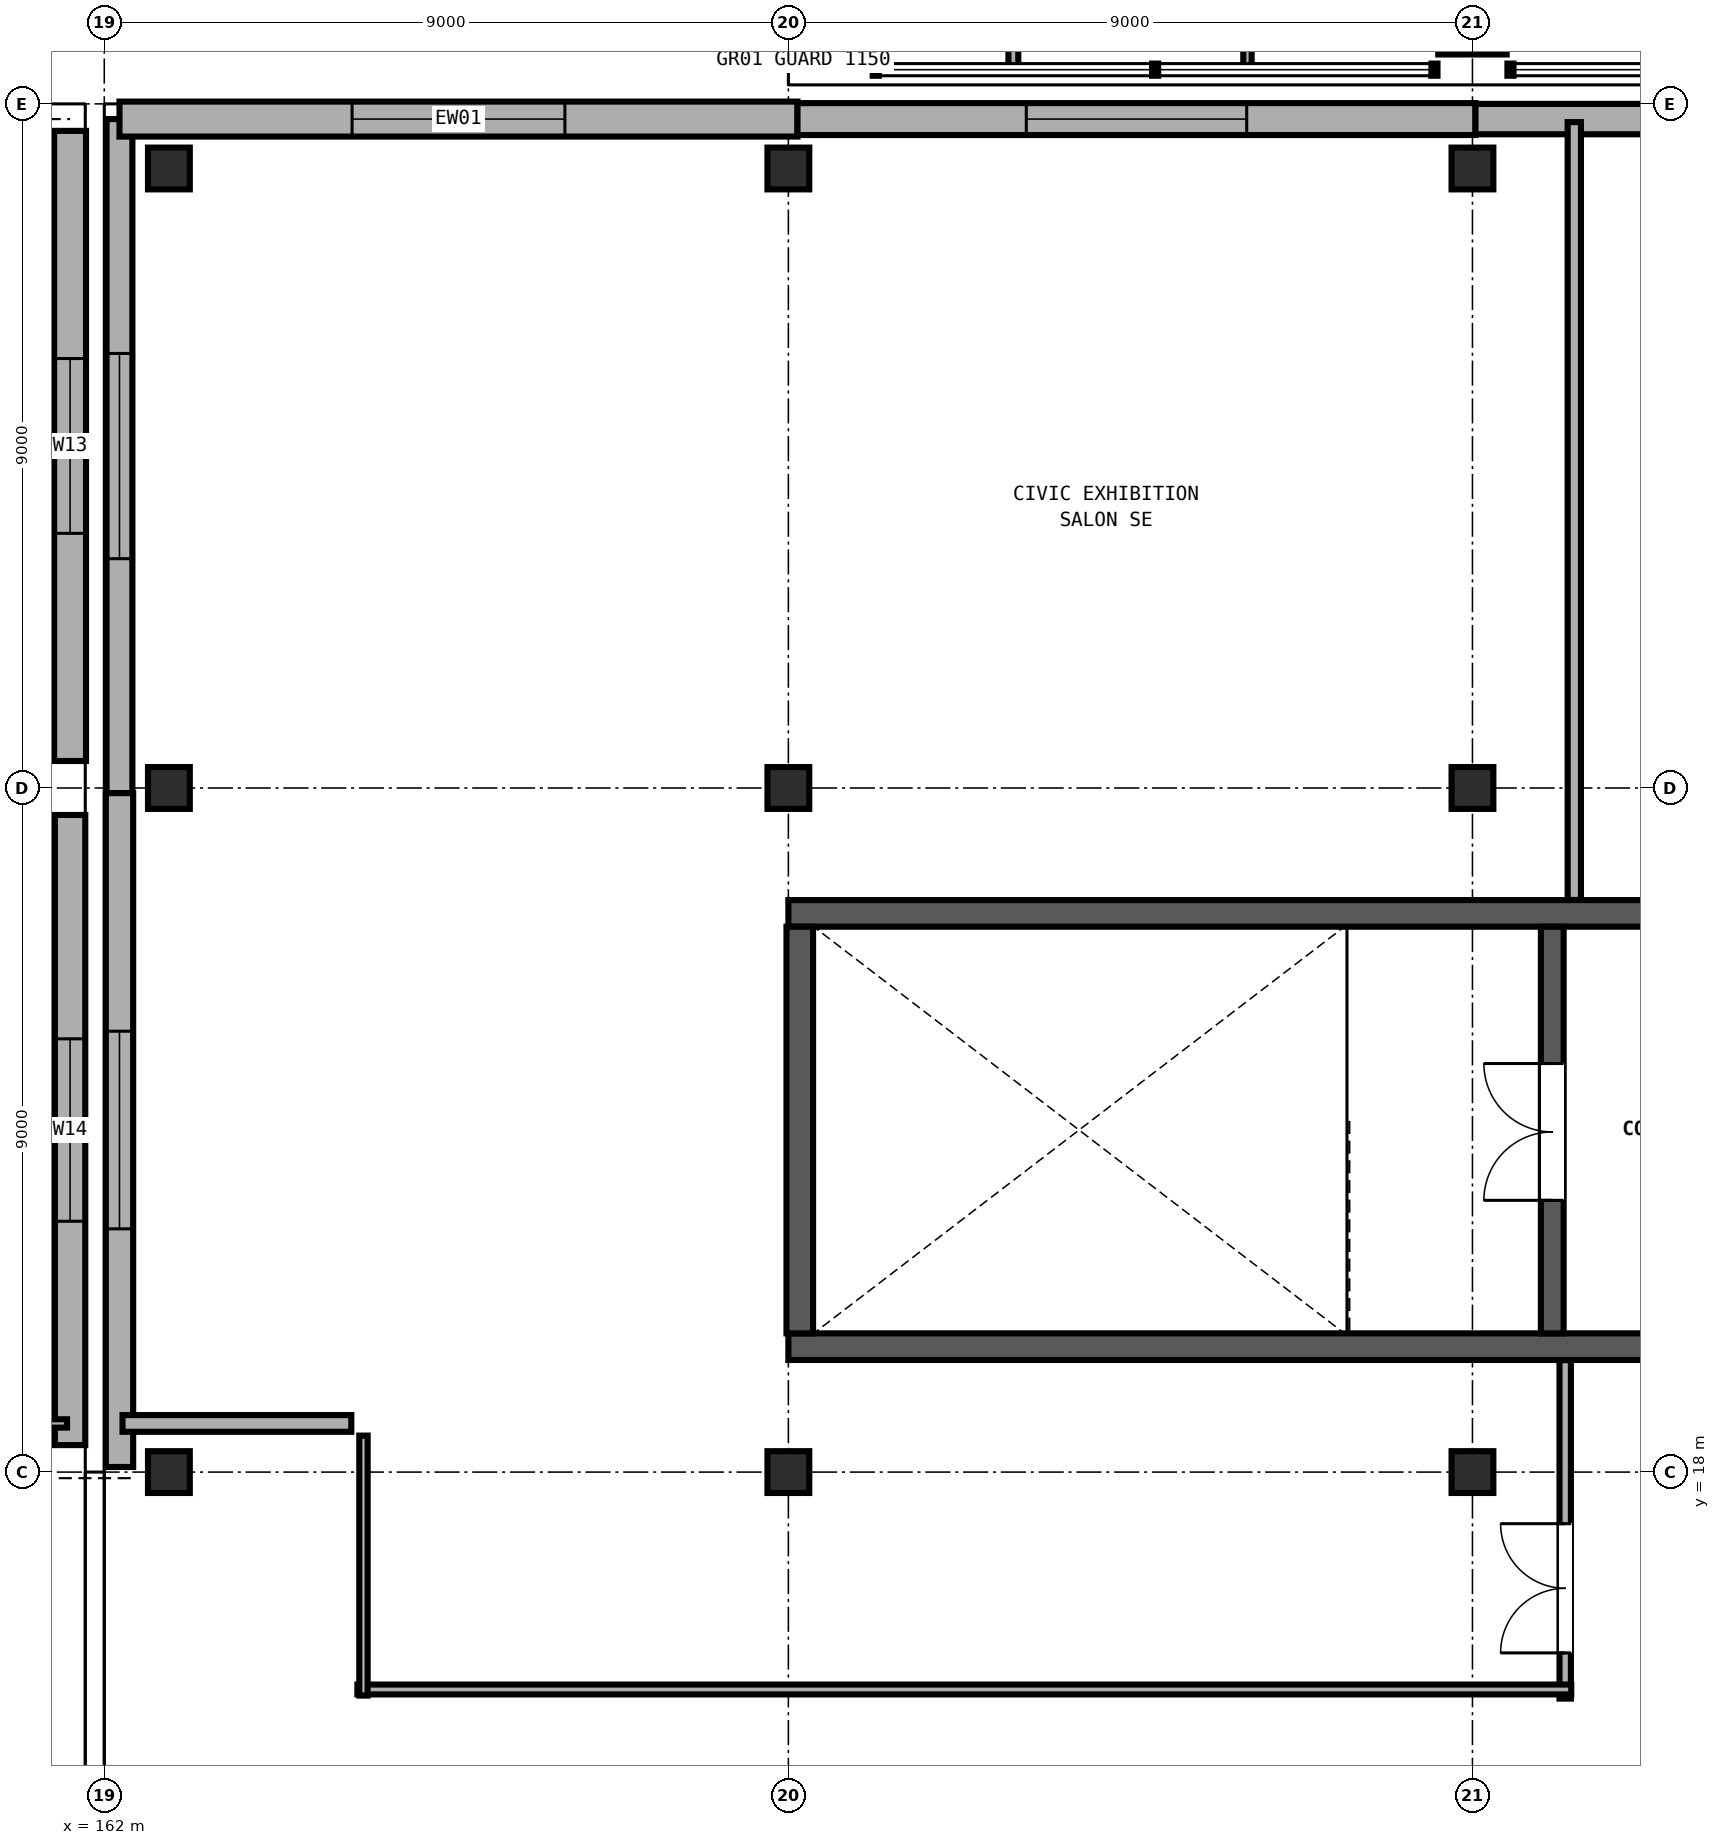
"""IFC4 building model, lengths in metres.
Left out: names, types, materials, properties, quantities, classifications, styles, units other than length and angle.
Written with IfcOpenShell. Run it as: python <this file> out.ifc"""

import sys

from ifc_helpers import new_model, si_unit, direction, frame, frame_2d, origin, origin_2d, place, context, subcontext, project, spatial, rectangle, extrude, element, fill, save


model = new_model("IFC4")
c1 = context("Model", 3, precision=1e-05, world=origin(), true_north=direction((0.0, 1.0)))
c2 = subcontext(c1, "Body", "Model", "MODEL_VIEW")
j1 = project(units=[si_unit("LENGTHUNIT", "METRE"), si_unit("PLANEANGLEUNIT", "RADIAN")], contexts=[c1])
p1 = place(None, origin())
s1 = spatial("IfcSite", under=j1, at=p1, CompositionType="ELEMENT")
p2 = place(p1, origin())
s2 = spatial("IfcBuilding", under=s1, at=p2, CompositionType="ELEMENT")
p3 = place(p2, frame((0.0, 0.0, 9.6)))
s3 = spatial("IfcBuildingStorey", under=s2, at=p3, CompositionType="ELEMENT", Elevation=9.6)
p4 = place(p3, frame((180.0, 37.1, 0.0), z_axis=(0.0, 0.0, 1.0), x_axis=(1.0, 0.0, 0.0)))
e1 = element("IfcColumn", 1, at=p4, inside=s3, PredefinedType="COLUMN", context=c2, shape_type="SweptSolid", body=[
    extrude(rectangle(XDim=0.9, YDim=0.9, at=origin_2d()), origin(), (0.0, 0.0, 1.0), 4.8),
])
for number, where, z_axis, x_axis in (
    (2, (162.85, 18.0, 0.0), (0.0, 0.0, 1.0), (1.0, 0.0, 0.0)),
    (3, (162.85, 27.0, 0.0), (0.0, 0.0, 1.0), (1.0, 0.0, 0.0)),
    (4, (162.85, 35.15, 0.0), (0.0, 0.0, 1.0), (1.0, 0.0, 0.0)),
    (5, (171.0, 18.0, 0.0), (0.0, 0.0, 1.0), (1.0, 0.0, 0.0)),
    (6, (171.0, 27.0, 0.0), (0.0, 0.0, 1.0), (1.0, 0.0, 0.0)),
    (7, (171.0, 35.15, 0.0), (0.0, 0.0, 1.0), (1.0, 0.0, 0.0)),
    (8, (180.0, 18.0, 0.0), (0.0, 0.0, 1.0), (1.0, 0.0, 0.0)),
    (9, (180.0, 27.0, 0.0), (0.0, 0.0, 1.0), (1.0, 0.0, 0.0)),
    (10, (180.0, 35.15, 0.0), (0.0, 0.0, 1.0), (1.0, 0.0, 0.0)),
):
    element("IfcColumn", number, at=place(p3, frame(where, z_axis=z_axis, x_axis=x_axis)), inside=s3, PredefinedType="COLUMN", context=c2, shape_type="SweptSolid", body=[
        extrude(rectangle(XDim=0.55, YDim=0.55, at=origin_2d()), origin(), (0.0, 0.0, 1.0), 4.8),
    ])
p5 = place(p3, frame((171.0, 19.65, 0.0), z_axis=(0.0, 0.0, 1.0), x_axis=(1.0, 0.0, 0.0)))
e11 = element("IfcWall", 11, at=p5, inside=s3, PredefinedType="SHEAR", context=c2, shape_type="SweptSolid", body=[
    extrude(rectangle(XDim=18.0, YDim=0.35, at=frame_2d((9.0, 0.0))), origin(), (0.0, 0.0, 1.0), 4.555),
])
p6 = place(p5, frame((11.4, 0.0, 0.0)))
e12 = element("IfcOpeningElement", 12, at=p6, cuts=e11, PredefinedType="OPENING", context=c2, shape_type="SweptSolid", body=[
    extrude(rectangle(XDim=1.9, YDim=2.25, at=frame_2d((0.95, 1.125))), frame((0.0, 0.185, 0.0), z_axis=(0.0, -1.0, 0.0), x_axis=(1.0, 0.0, 0.0)), (0.0, 0.0, 1.0), 0.37),
])
p7 = place(p3, frame((189.0, 25.35, 0.0), z_axis=(0.0, 0.0, 1.0), x_axis=(-1.0, 0.0, 0.0)))
e13 = element("IfcWall", 13, at=p7, inside=s3, PredefinedType="SHEAR", context=c2, shape_type="SweptSolid", body=[
    extrude(rectangle(XDim=18.0, YDim=0.35, at=frame_2d((9.0, 0.0))), origin(), (0.0, 0.0, 1.0), 4.555),
])
p8 = place(p3, frame((171.15, 25.175, 0.0), z_axis=(0.0, 0.0, 1.0), x_axis=(0.0, -1.0, 0.0)))
e14 = element("IfcWall", 14, at=p8, inside=s3, PredefinedType="SHEAR", context=c2, shape_type="SweptSolid", body=[
    extrude(rectangle(XDim=5.35, YDim=0.35, at=frame_2d((2.675, 0.0))), origin(), (0.0, 0.0, 1.0), 4.555),
])
p9 = place(p3, frame((181.05, 19.825, 0.0), z_axis=(0.0, 0.0, 1.0), x_axis=(0.0, 1.0, 0.0)))
e15 = element("IfcWall", 15, at=p9, inside=s3, PredefinedType="SHEAR", context=c2, shape_type="SweptSolid", body=[
    extrude(rectangle(XDim=5.35, YDim=0.3, at=frame_2d((2.675, 0.0))), origin(), (0.0, 0.0, 1.0), 4.555),
])
p10 = place(p9, frame((1.75, 0.0, 0.0)))
e16 = element("IfcOpeningElement", 16, at=p10, cuts=e15, PredefinedType="OPENING", context=c2, shape_type="SweptSolid", body=[
    extrude(rectangle(XDim=1.8, YDim=2.25, at=frame_2d((0.9, 1.125))), frame((0.0, 0.16, 0.0), z_axis=(0.0, -1.0, 0.0), x_axis=(1.0, 0.0, 0.0)), (0.0, 0.0, 1.0), 0.32),
])
p11 = place(p3, frame((161.55, 35.645, 0.0), z_axis=(0.0, 0.0, 1.0), x_axis=(0.0, -1.0, 0.0)))
e17 = element("IfcWall", 17, at=p11, inside=s3, PredefinedType="SOLIDWALL", context=c2, shape_type="SweptSolid", body=[
    extrude(rectangle(XDim=8.29, YDim=0.42, at=frame_2d((4.145, 0.0))), origin(), (0.0, 0.0, 1.0), 3.58),
])
p12 = place(p11, frame((2.995, 0.0, 0.9)))
e18 = element("IfcOpeningElement", 18, at=p12, cuts=e17, PredefinedType="OPENING", context=c2, shape_type="SweptSolid", body=[
    extrude(rectangle(XDim=2.3, YDim=2.0, at=frame_2d((1.15, 1.0))), frame((0.0, 0.22, 0.0), z_axis=(0.0, -1.0, 0.0), x_axis=(1.0, 0.0, 0.0)), (0.0, 0.0, 1.0), 0.44),
])
p13 = place(p3, frame((161.55, 26.645, 0.0), z_axis=(0.0, 0.0, 1.0), x_axis=(0.0, -1.0, 0.0)))
e19 = element("IfcWall", 19, at=p13, inside=s3, PredefinedType="SOLIDWALL", context=c2, shape_type="SweptSolid", body=[
    extrude(rectangle(XDim=8.29, YDim=0.4, at=frame_2d((4.145, 0.0))), origin(), (0.0, 0.0, 1.0), 3.58),
])
p14 = place(p13, frame((2.945, 0.0, 0.9)))
e20 = element("IfcOpeningElement", 20, at=p14, cuts=e19, PredefinedType="OPENING", context=c2, shape_type="SweptSolid", body=[
    extrude(rectangle(XDim=2.4, YDim=2.05, at=frame_2d((1.2, 1.025))), frame((0.0, 0.21, 0.0), z_axis=(0.0, -1.0, 0.0), x_axis=(1.0, 0.0, 0.0)), (0.0, 0.0, 1.0), 0.42),
])
p15 = place(p3, frame((162.2, 18.067, 0.0), z_axis=(0.0, 0.0, 1.0), x_axis=(0.0, 1.0, 0.0)))
e21 = element("IfcWall", 21, at=p15, inside=s3, PredefinedType="SOLIDWALL", context=c2, shape_type="SweptSolid", body=[
    extrude(rectangle(XDim=8.867, YDim=0.36, at=frame_2d((4.433, 0.0))), origin(), (0.0, 0.0, 1.0), 3.58),
])
p16 = place(p15, frame((3.133, 0.0, 0.9)))
e22 = element("IfcOpeningElement", 22, at=p16, cuts=e21, PredefinedType="OPENING", context=c2, shape_type="SweptSolid", body=[
    extrude(rectangle(XDim=2.6, YDim=2.15, at=frame_2d((1.3, 1.075))), frame((0.0, 0.19, 0.0), z_axis=(0.0, -1.0, 0.0), x_axis=(1.0, 0.0, 0.0)), (0.0, 0.0, 1.0), 0.38),
])
p17 = place(p3, frame((162.2, 26.933, 0.0), z_axis=(0.0, 0.0, 1.0), x_axis=(0.0, 1.0, 0.0)))
e23 = element("IfcWall", 23, at=p17, inside=s3, PredefinedType="SOLIDWALL", context=c2, shape_type="SweptSolid", body=[
    extrude(rectangle(XDim=8.867, YDim=0.34, at=frame_2d((4.433, 0.0))), origin(), (0.0, 0.0, 1.0), 3.58),
])
p18 = place(p17, frame((3.083, 0.0, 0.9)))
e24 = element("IfcOpeningElement", 24, at=p18, cuts=e23, PredefinedType="OPENING", context=c2, shape_type="SweptSolid", body=[
    extrude(rectangle(XDim=2.7, YDim=2.15, at=frame_2d((1.35, 1.075))), frame((0.0, 0.18, 0.0), z_axis=(0.0, -1.0, 0.0), x_axis=(1.0, 0.0, 0.0)), (0.0, 0.0, 1.0), 0.36),
])
p19 = place(p3, frame((162.2, 35.8, 0.0), z_axis=(0.0, 0.0, 1.0), x_axis=(1.0, 0.0, 0.0)))
e25 = element("IfcWall", 25, at=p19, inside=s3, PredefinedType="SOLIDWALL", context=c2, shape_type="SweptSolid", body=[
    extrude(rectangle(XDim=8.92, YDim=0.46, at=frame_2d((4.46, 0.0))), origin(), (0.0, 0.0, 1.0), 3.58),
])
p20 = place(p19, frame((3.06, 0.0, 0.9)))
e26 = element("IfcOpeningElement", 26, at=p20, cuts=e25, PredefinedType="OPENING", context=c2, shape_type="SweptSolid", body=[
    extrude(rectangle(XDim=2.8, YDim=2.2, at=frame_2d((1.4, 1.1))), frame((0.0, 0.24, 0.0), z_axis=(0.0, -1.0, 0.0), x_axis=(1.0, 0.0, 0.0)), (0.0, 0.0, 1.0), 0.48),
])
p21 = place(p3, frame((171.12, 35.8, 0.0), z_axis=(0.0, 0.0, 1.0), x_axis=(1.0, 0.0, 0.0)))
e27 = element("IfcWall", 27, at=p21, inside=s3, PredefinedType="SOLIDWALL", context=c2, shape_type="SweptSolid", body=[
    extrude(rectangle(XDim=8.92, YDim=0.42, at=frame_2d((4.46, 0.0))), origin(), (0.0, 0.0, 1.0), 3.58),
])
p22 = place(p21, frame((3.01, 0.0, 0.9)))
e28 = element("IfcOpeningElement", 28, at=p22, cuts=e27, PredefinedType="OPENING", context=c2, shape_type="SweptSolid", body=[
    extrude(rectangle(XDim=2.9, YDim=2.2, at=frame_2d((1.45, 1.1))), frame((0.0, 0.22, 0.0), z_axis=(0.0, -1.0, 0.0), x_axis=(1.0, 0.0, 0.0)), (0.0, 0.0, 1.0), 0.44),
])
p23 = place(p3, frame((180.04, 35.8, 0.0), z_axis=(0.0, 0.0, 1.0), x_axis=(1.0, 0.0, 0.0)))
e29 = element("IfcWall", 29, at=p23, inside=s3, PredefinedType="SOLIDWALL", context=c2, shape_type="SweptSolid", body=[
    extrude(rectangle(XDim=8.92, YDim=0.4, at=frame_2d((4.46, 0.0))), origin(), (0.0, 0.0, 1.0), 3.58),
])
p24 = place(p23, frame((2.96, 0.0, 0.9)))
e30 = element("IfcOpeningElement", 30, at=p24, cuts=e29, PredefinedType="OPENING", context=c2, shape_type="SweptSolid", body=[
    extrude(rectangle(XDim=3.0, YDim=2.2, at=frame_2d((1.5, 1.1))), frame((0.0, 0.21, 0.0), z_axis=(0.0, -1.0, 0.0), x_axis=(1.0, 0.0, 0.0)), (0.0, 0.0, 1.0), 0.42),
])
p25 = place(p3, frame((177.04, 59.23, 0.0), z_axis=(0.0, 0.0, 1.0), x_axis=(0.0, -1.0, 0.0)))
e31 = element("IfcWall", 31, at=p25, inside=s3, PredefinedType="PARTITIONING", context=c2, shape_type="SweptSolid", body=[
    extrude(rectangle(XDim=22.78, YDim=0.11, at=frame_2d((11.39, 0.0))), origin(), (0.0, 0.0, 1.0), 3.56),
])
p26 = place(p25, frame((9.188, 0.0, 0.0)))
e32 = element("IfcOpeningElement", 32, at=p26, cuts=e31, PredefinedType="OPENING", context=c2, shape_type="SweptSolid", body=[
    extrude(rectangle(XDim=1.7, YDim=2.2, at=frame_2d((0.85, 1.1))), frame((0.0, 0.065, 0.0), z_axis=(0.0, -1.0, 0.0), x_axis=(1.0, 0.0, 0.0)), (0.0, 0.0, 1.0), 0.13),
])
p27 = place(p3, frame((173.96, 36.45, 0.0), z_axis=(0.0, 0.0, 1.0), x_axis=(0.0, 1.0, 0.0)))
e33 = element("IfcWall", 33, at=p27, inside=s3, PredefinedType="PARTITIONING", context=c2, shape_type="SweptSolid", body=[
    extrude(rectangle(XDim=17.892, YDim=0.13, at=frame_2d((8.946, 0.0))), origin(), (0.0, 0.0, 1.0), 3.56),
])
p28 = place(p27, frame((11.563, 0.0, 0.0)))
e34 = element("IfcOpeningElement", 34, at=p28, cuts=e33, PredefinedType="OPENING", context=c2, shape_type="SweptSolid", body=[
    extrude(rectangle(XDim=1.12, YDim=2.22, at=frame_2d((0.56, 1.11))), frame((0.0, 0.075, 0.0), z_axis=(0.0, -1.0, 0.0), x_axis=(1.0, 0.0, 0.0)), (0.0, 0.0, 1.0), 0.15),
])
p29 = place(p3, frame((161.51, 18.64, 0.0), z_axis=(0.0, 0.0, 1.0), x_axis=(-1.0, 0.0, 0.0)))
e35 = element("IfcWall", 35, at=p29, inside=s3, PredefinedType="PARTITIONING", context=c2, shape_type="SweptSolid", body=[
    extrude(rectangle(XDim=3.36, YDim=0.11, at=frame_2d((1.68, 0.0))), origin(), (0.0, 0.0, 1.0), 3.56),
])
p30 = place(p3, frame((181.34, 25.527, 0.0), z_axis=(0.0, 0.0, 1.0), x_axis=(0.0, 1.0, 0.0)))
e36 = element("IfcWall", 36, at=p30, inside=s3, PredefinedType="PARTITIONING", context=c2, shape_type="SweptSolid", body=[
    extrude(rectangle(XDim=10.233, YDim=0.175, at=frame_2d((5.116, 0.0))), origin(), (0.0, 0.0, 1.0), 3.56),
])
p31 = place(p3, frame((181.22, 15.02, 0.0), z_axis=(0.0, 0.0, 1.0), x_axis=(0.0, 1.0, 0.0)))
e37 = element("IfcWall", 37, at=p31, inside=s3, PredefinedType="PARTITIONING", context=c2, shape_type="SweptSolid", body=[
    extrude(rectangle(XDim=4.453, YDim=0.15, at=frame_2d((2.227, 0.0))), origin(), (0.0, 0.0, 1.0), 3.56),
])
p32 = place(p31, frame((0.601, 0.0, 0.0)))
e38 = element("IfcOpeningElement", 38, at=p32, cuts=e37, PredefinedType="OPENING", context=c2, shape_type="SweptSolid", body=[
    extrude(rectangle(XDim=1.7, YDim=2.2, at=frame_2d((0.85, 1.1))), frame((0.0, 0.085, 0.0), z_axis=(0.0, -1.0, 0.0), x_axis=(1.0, 0.0, 0.0)), (0.0, 0.0, 1.0), 0.17),
])
p33 = place(p3, frame((181.3, 15.14, 0.0), z_axis=(0.0, 0.0, 1.0), x_axis=(-1.0, 0.0, 0.0)))
e39 = element("IfcWall", 39, at=p33, inside=s3, PredefinedType="PARTITIONING", context=c2, shape_type="SweptSolid", body=[
    extrude(rectangle(XDim=15.97, YDim=0.13, at=frame_2d((7.985, 0.0))), origin(), (0.0, 0.0, 1.0), 3.56),
])
p34 = place(p3, frame((165.41, 15.06, 0.0), z_axis=(0.0, 0.0, 1.0), x_axis=(0.0, 1.0, 0.0)))
e40 = element("IfcWall", 40, at=p34, inside=s3, PredefinedType="PARTITIONING", context=c2, shape_type="SweptSolid", body=[
    extrude(rectangle(XDim=3.42, YDim=0.11, at=frame_2d((1.71, 0.0))), origin(), (0.0, 0.0, 1.0), 3.56),
])
p35 = place(p3, frame((165.25, 18.64, 0.0), z_axis=(0.0, 0.0, 1.0), x_axis=(-1.0, 0.0, 0.0)))
e41 = element("IfcWall", 41, at=p35, inside=s3, PredefinedType="PARTITIONING", context=c2, shape_type="SweptSolid", body=[
    extrude(rectangle(XDim=3.01, YDim=0.22, at=frame_2d((1.505, 0.0))), origin(), (0.0, 0.0, 1.0), 3.56),
])
p36 = place(p12, origin())
e42 = element("IfcWindow", 42, at=p36, inside=s3, PartitioningType="DOUBLE_PANEL_VERTICAL", PredefinedType="WINDOW", context=c2, shape_type="SweptSolid", body=[
    extrude(rectangle(XDim=2.3, YDim=2.0, at=frame_2d((1.15, 1.0))), frame((0.0, 0.03, 0.0), z_axis=(0.0, -1.0, 0.0), x_axis=(1.0, 0.0, 0.0)), (0.0, 0.0, 1.0), 0.06),
])
fill(e18, e42)
p37 = place(p14, origin())
e43 = element("IfcWindow", 43, at=p37, inside=s3, PartitioningType="DOUBLE_PANEL_VERTICAL", PredefinedType="WINDOW", context=c2, shape_type="SweptSolid", body=[
    extrude(rectangle(XDim=2.4, YDim=2.05, at=frame_2d((1.2, 1.025))), frame((0.0, 0.03, 0.0), z_axis=(0.0, -1.0, 0.0), x_axis=(1.0, 0.0, 0.0)), (0.0, 0.0, 1.0), 0.06),
])
fill(e20, e43)
p38 = place(p16, origin())
e44 = element("IfcWindow", 44, at=p38, inside=s3, PartitioningType="DOUBLE_PANEL_VERTICAL", PredefinedType="WINDOW", context=c2, shape_type="SweptSolid", body=[
    extrude(rectangle(XDim=2.6, YDim=2.15, at=frame_2d((1.3, 1.075))), frame((0.0, 0.03, 0.0), z_axis=(0.0, -1.0, 0.0), x_axis=(1.0, 0.0, 0.0)), (0.0, 0.0, 1.0), 0.06),
])
fill(e22, e44)
p39 = place(p18, origin())
e45 = element("IfcWindow", 45, at=p39, inside=s3, PartitioningType="DOUBLE_PANEL_VERTICAL", PredefinedType="WINDOW", context=c2, shape_type="SweptSolid", body=[
    extrude(rectangle(XDim=2.7, YDim=2.15, at=frame_2d((1.35, 1.075))), frame((0.0, 0.03, 0.0), z_axis=(0.0, -1.0, 0.0), x_axis=(1.0, 0.0, 0.0)), (0.0, 0.0, 1.0), 0.06),
])
fill(e24, e45)
p40 = place(p20, origin())
e46 = element("IfcWindow", 46, at=p40, inside=s3, PartitioningType="DOUBLE_PANEL_VERTICAL", PredefinedType="WINDOW", context=c2, shape_type="SweptSolid", body=[
    extrude(rectangle(XDim=2.8, YDim=2.2, at=frame_2d((1.4, 1.1))), frame((0.0, 0.03, 0.0), z_axis=(0.0, -1.0, 0.0), x_axis=(1.0, 0.0, 0.0)), (0.0, 0.0, 1.0), 0.06),
])
fill(e26, e46)
p41 = place(p22, origin())
e47 = element("IfcWindow", 47, at=p41, inside=s3, PartitioningType="DOUBLE_PANEL_VERTICAL", PredefinedType="WINDOW", context=c2, shape_type="SweptSolid", body=[
    extrude(rectangle(XDim=2.9, YDim=2.2, at=frame_2d((1.45, 1.1))), frame((0.0, 0.03, 0.0), z_axis=(0.0, -1.0, 0.0), x_axis=(1.0, 0.0, 0.0)), (0.0, 0.0, 1.0), 0.06),
])
fill(e28, e47)
p42 = place(p10, origin())
e48 = element("IfcDoor", 48, at=p42, inside=s3, OperationType="DOUBLE_DOOR_SINGLE_SWING", PredefinedType="DOOR", context=c2, shape_type="SweptSolid", body=[
    extrude(rectangle(XDim=1.8, YDim=2.25, at=frame_2d((0.9, 1.125))), frame((0.0, 0.025, 0.0), z_axis=(0.0, -1.0, 0.0), x_axis=(1.0, 0.0, 0.0)), (0.0, 0.0, 1.0), 0.05),
])
fill(e16, e48)
p43 = place(p32, origin())
e49 = element("IfcDoor", 49, at=p43, inside=s3, OperationType="DOUBLE_DOOR_SINGLE_SWING", PredefinedType="DOOR", context=c2, shape_type="SweptSolid", body=[
    extrude(rectangle(XDim=1.7, YDim=2.2, at=frame_2d((0.85, 1.1))), frame((0.0, 0.025, 0.0), z_axis=(0.0, -1.0, 0.0), x_axis=(1.0, 0.0, 0.0)), (0.0, 0.0, 1.0), 0.05),
])
fill(e38, e49)
save(model, sys.argv[1])
